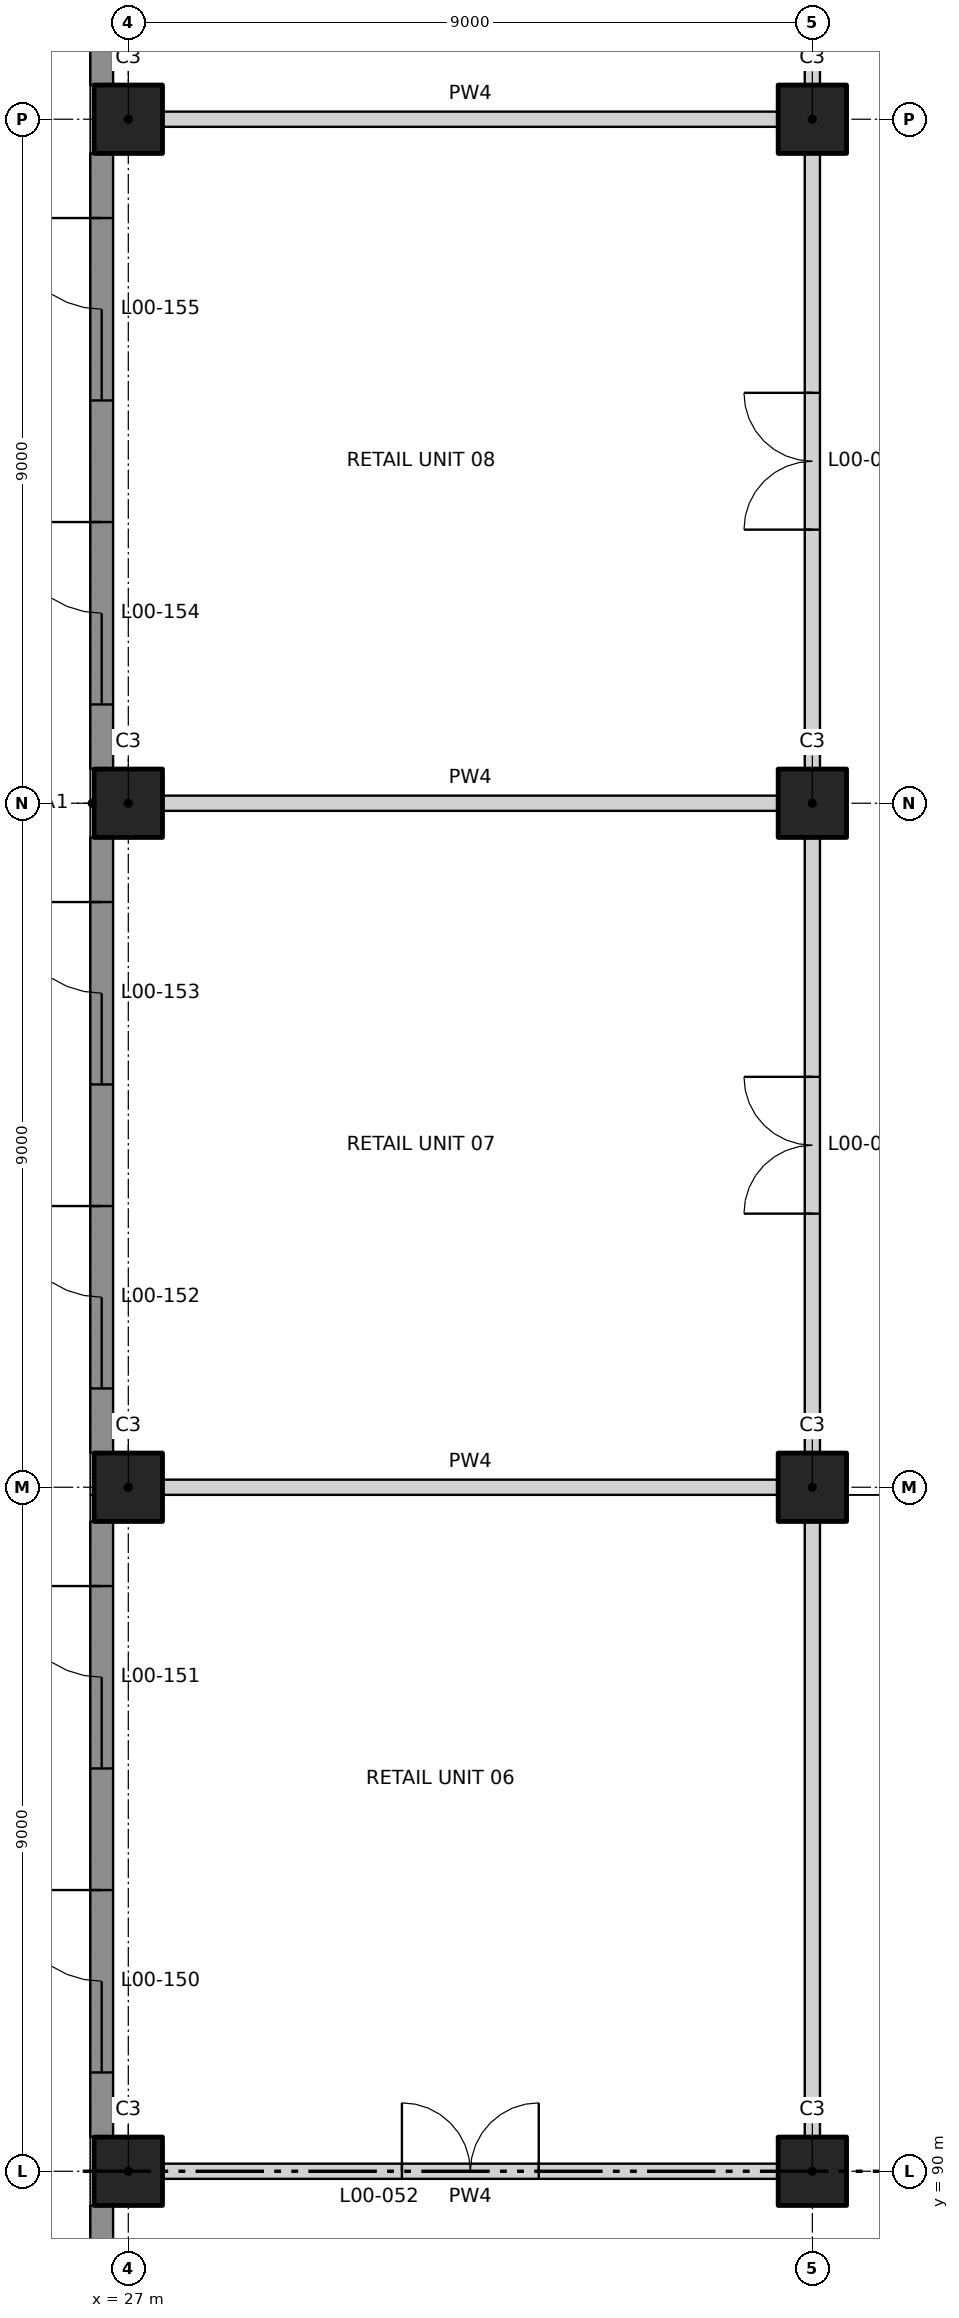
"""IFC4 building model, lengths in metres.
Left out: names, types, materials, properties, quantities, classifications, styles, units other than length and angle.
Written with IfcOpenShell. Run it as: python <this file> out.ifc"""

import sys

from ifc_helpers import new_model, si_unit, direction, frame, frame_2d, origin, origin_2d, place, context, subcontext, project, spatial, rectangle, extrude, element, fill, save


model = new_model("IFC4")
c1 = context("Model", 3, precision=1e-05, world=origin(), true_north=direction((0.0, 1.0)))
c2 = subcontext(c1, "Body", "Model", "MODEL_VIEW")
j1 = project(units=[si_unit("LENGTHUNIT", "METRE"), si_unit("PLANEANGLEUNIT", "RADIAN")], contexts=[c1])
p1 = place(None, origin())
s1 = spatial("IfcSite", under=j1, at=p1, CompositionType="ELEMENT")
p2 = place(p1, origin())
s2 = spatial("IfcBuilding", under=s1, at=p2, CompositionType="ELEMENT")
p3 = place(p2, origin())
s3 = spatial("IfcBuildingStorey", under=s2, at=p3, CompositionType="ELEMENT", Elevation=0.0)
for number, where, z_axis, x_axis in (
    (1, (27.0, 90.0, 0.0), (0.0, 0.0, 1.0), (1.0, 0.0, 0.0)),
    (2, (27.0, 99.0, 0.0), (0.0, 0.0, 1.0), (1.0, 0.0, 0.0)),
    (3, (27.0, 108.0, 0.0), (0.0, 0.0, 1.0), (1.0, 0.0, 0.0)),
    (4, (27.0, 117.0, 0.0), (0.0, 0.0, 1.0), (1.0, 0.0, 0.0)),
    (5, (36.0, 90.0, 0.0), (0.0, 0.0, 1.0), (1.0, 0.0, 0.0)),
    (6, (36.0, 99.0, 0.0), (0.0, 0.0, 1.0), (1.0, 0.0, 0.0)),
    (7, (36.0, 108.0, 0.0), (0.0, 0.0, 1.0), (1.0, 0.0, 0.0)),
    (8, (36.0, 117.0, 0.0), (0.0, 0.0, 1.0), (1.0, 0.0, 0.0)),
):
    element("IfcColumn", number, at=place(p3, frame(where, z_axis=z_axis, x_axis=x_axis)), inside=s3, PredefinedType="COLUMN", context=c2, shape_type="SweptSolid", body=[
        extrude(rectangle(XDim=0.9, YDim=0.9, at=origin_2d()), origin(), (0.0, 0.0, 1.0), 7.0),
    ])
p4 = place(p3, frame((27.45, 90.0, 0.0), z_axis=(0.0, 0.0, 1.0), x_axis=(1.0, 0.0, 0.0)))
e9 = element("IfcWall", 9, at=p4, inside=s3, PredefinedType="PARTITIONING", context=c2, shape_type="SweptSolid", body=[
    extrude(rectangle(XDim=8.1, YDim=0.2, at=frame_2d((4.05, 0.0))), origin(), (0.0, 0.0, 1.0), 5.75),
])
p5 = place(p4, frame((3.15, 0.0, 0.0)))
e10 = element("IfcOpeningElement", 10, at=p5, cuts=e9, PredefinedType="OPENING", context=c2, shape_type="SweptSolid", body=[
    extrude(rectangle(XDim=1.8, YDim=2.1, at=frame_2d((0.9, 1.05))), frame((0.0, 0.11, 0.0), z_axis=(0.0, -1.0, 0.0), x_axis=(1.0, 0.0, 0.0)), (0.0, 0.0, 1.0), 0.22),
])
for number, where, z_axis, x_axis in (
    (11, (27.45, 99.0, 0.0), (0.0, 0.0, 1.0), (1.0, 0.0, 0.0)),
    (12, (27.45, 108.0, 0.0), (0.0, 0.0, 1.0), (1.0, 0.0, 0.0)),
    (13, (27.45, 117.0, 0.0), (0.0, 0.0, 1.0), (1.0, 0.0, 0.0)),
    (14, (36.0, 90.45, 0.0), (0.0, 0.0, 1.0), (0.0, 1.0, 0.0)),
):
    element("IfcWall", number, at=place(p3, frame(where, z_axis=z_axis, x_axis=x_axis)), inside=s3, PredefinedType="PARTITIONING", context=c2, shape_type="SweptSolid", body=[
        extrude(rectangle(XDim=8.1, YDim=0.2, at=frame_2d((4.05, 0.0))), origin(), (0.0, 0.0, 1.0), 5.75),
    ])
p6 = place(p3, frame((36.0, 99.45, 0.0), z_axis=(0.0, 0.0, 1.0), x_axis=(0.0, 1.0, 0.0)))
e15 = element("IfcWall", 15, at=p6, inside=s3, PredefinedType="PARTITIONING", context=c2, shape_type="SweptSolid", body=[
    extrude(rectangle(XDim=8.1, YDim=0.2, at=frame_2d((4.05, 0.0))), origin(), (0.0, 0.0, 1.0), 5.75),
])
p7 = place(p6, frame((3.15, 0.0, 0.0)))
e16 = element("IfcOpeningElement", 16, at=p7, cuts=e15, PredefinedType="OPENING", context=c2, shape_type="SweptSolid", body=[
    extrude(rectangle(XDim=1.8, YDim=2.1, at=frame_2d((0.9, 1.05))), frame((0.0, 0.11, 0.0), z_axis=(0.0, -1.0, 0.0), x_axis=(1.0, 0.0, 0.0)), (0.0, 0.0, 1.0), 0.22),
])
p8 = place(p3, frame((36.0, 108.45, 0.0), z_axis=(0.0, 0.0, 1.0), x_axis=(0.0, 1.0, 0.0)))
e17 = element("IfcWall", 17, at=p8, inside=s3, PredefinedType="PARTITIONING", context=c2, shape_type="SweptSolid", body=[
    extrude(rectangle(XDim=8.1, YDim=0.2, at=frame_2d((4.05, 0.0))), origin(), (0.0, 0.0, 1.0), 5.75),
])
p9 = place(p8, frame((3.15, 0.0, 0.0)))
e18 = element("IfcOpeningElement", 18, at=p9, cuts=e17, PredefinedType="OPENING", context=c2, shape_type="SweptSolid", body=[
    extrude(rectangle(XDim=1.8, YDim=2.1, at=frame_2d((0.9, 1.05))), frame((0.0, 0.11, 0.0), z_axis=(0.0, -1.0, 0.0), x_axis=(1.0, 0.0, 0.0)), (0.0, 0.0, 1.0), 0.22),
])
p10 = place(p3, frame((36.0, 117.45, 0.0), z_axis=(0.0, 0.0, 1.0), x_axis=(0.0, 1.0, 0.0)))
e19 = element("IfcWall", 19, at=p10, inside=s3, PredefinedType="PARTITIONING", context=c2, shape_type="SweptSolid", body=[
    extrude(rectangle(XDim=8.55, YDim=0.2, at=frame_2d((4.275, 0.0))), origin(), (0.0, 0.0, 1.0), 5.75),
])
p11 = place(p10, frame((3.775, 0.0, 0.0)))
e20 = element("IfcOpeningElement", 20, at=p11, cuts=e19, PredefinedType="OPENING", context=c2, shape_type="SweptSolid", body=[
    extrude(rectangle(XDim=1.0, YDim=2.1, at=frame_2d((0.5, 1.05))), frame((0.0, 0.11, 0.0), z_axis=(0.0, -1.0, 0.0), x_axis=(1.0, 0.0, 0.0)), (0.0, 0.0, 1.0), 0.22),
])
p12 = place(p3, frame((26.65, 89.55, 0.0), z_axis=(0.0, 0.0, 1.0), x_axis=(0.0, -1.0, 0.0)))
e21 = element("IfcWall", 21, at=p12, inside=s3, PredefinedType="SOLIDWALL", context=c2, shape_type="SweptSolid", body=[
    extrude(rectangle(XDim=8.1, YDim=0.3, at=frame_2d((4.05, 0.0))), origin(), (0.0, 0.0, 1.0), 7.0),
])
p13 = place(p12, frame((4.85, 0.0, 0.0)))
e22 = element("IfcOpeningElement", 22, at=p13, cuts=e21, PredefinedType="OPENING", context=c2, shape_type="SweptSolid", body=[
    extrude(rectangle(XDim=2.4, YDim=2.4, at=frame_2d((1.2, 1.2))), frame((0.0, 0.16, 0.0), z_axis=(0.0, -1.0, 0.0), x_axis=(1.0, 0.0, 0.0)), (0.0, 0.0, 1.0), 0.32),
])
p14 = place(p12, frame((0.85, 0.0, 0.0)))
e23 = element("IfcOpeningElement", 23, at=p14, cuts=e21, PredefinedType="OPENING", context=c2, shape_type="SweptSolid", body=[
    extrude(rectangle(XDim=2.4, YDim=2.4, at=frame_2d((1.2, 1.2))), frame((0.0, 0.16, 0.0), z_axis=(0.0, -1.0, 0.0), x_axis=(1.0, 0.0, 0.0)), (0.0, 0.0, 1.0), 0.32),
])
p15 = place(p3, frame((26.65, 98.55, 0.0), z_axis=(0.0, 0.0, 1.0), x_axis=(0.0, -1.0, 0.0)))
e24 = element("IfcWall", 24, at=p15, inside=s3, PredefinedType="SOLIDWALL", context=c2, shape_type="SweptSolid", body=[
    extrude(rectangle(XDim=8.1, YDim=0.3, at=frame_2d((4.05, 0.0))), origin(), (0.0, 0.0, 1.0), 7.0),
])
p16 = place(p15, frame((4.85, 0.0, 0.0)))
e25 = element("IfcOpeningElement", 25, at=p16, cuts=e24, PredefinedType="OPENING", context=c2, shape_type="SweptSolid", body=[
    extrude(rectangle(XDim=2.4, YDim=2.4, at=frame_2d((1.2, 1.2))), frame((0.0, 0.16, 0.0), z_axis=(0.0, -1.0, 0.0), x_axis=(1.0, 0.0, 0.0)), (0.0, 0.0, 1.0), 0.32),
])
p17 = place(p15, frame((0.85, 0.0, 0.0)))
e26 = element("IfcOpeningElement", 26, at=p17, cuts=e24, PredefinedType="OPENING", context=c2, shape_type="SweptSolid", body=[
    extrude(rectangle(XDim=2.4, YDim=2.4, at=frame_2d((1.2, 1.2))), frame((0.0, 0.16, 0.0), z_axis=(0.0, -1.0, 0.0), x_axis=(1.0, 0.0, 0.0)), (0.0, 0.0, 1.0), 0.32),
])
p18 = place(p3, frame((26.65, 107.55, 0.0), z_axis=(0.0, 0.0, 1.0), x_axis=(0.0, -1.0, 0.0)))
e27 = element("IfcWall", 27, at=p18, inside=s3, PredefinedType="SOLIDWALL", context=c2, shape_type="SweptSolid", body=[
    extrude(rectangle(XDim=8.1, YDim=0.3, at=frame_2d((4.05, 0.0))), origin(), (0.0, 0.0, 1.0), 7.0),
])
p19 = place(p18, frame((4.85, 0.0, 0.0)))
e28 = element("IfcOpeningElement", 28, at=p19, cuts=e27, PredefinedType="OPENING", context=c2, shape_type="SweptSolid", body=[
    extrude(rectangle(XDim=2.4, YDim=2.4, at=frame_2d((1.2, 1.2))), frame((0.0, 0.16, 0.0), z_axis=(0.0, -1.0, 0.0), x_axis=(1.0, 0.0, 0.0)), (0.0, 0.0, 1.0), 0.32),
])
p20 = place(p18, frame((0.85, 0.0, 0.0)))
e29 = element("IfcOpeningElement", 29, at=p20, cuts=e27, PredefinedType="OPENING", context=c2, shape_type="SweptSolid", body=[
    extrude(rectangle(XDim=2.4, YDim=2.4, at=frame_2d((1.2, 1.2))), frame((0.0, 0.16, 0.0), z_axis=(0.0, -1.0, 0.0), x_axis=(1.0, 0.0, 0.0)), (0.0, 0.0, 1.0), 0.32),
])
p21 = place(p3, frame((26.65, 116.55, 0.0), z_axis=(0.0, 0.0, 1.0), x_axis=(0.0, -1.0, 0.0)))
e30 = element("IfcWall", 30, at=p21, inside=s3, PredefinedType="SOLIDWALL", context=c2, shape_type="SweptSolid", body=[
    extrude(rectangle(XDim=8.1, YDim=0.3, at=frame_2d((4.05, 0.0))), origin(), (0.0, 0.0, 1.0), 7.0),
])
p22 = place(p21, frame((4.85, 0.0, 0.0)))
e31 = element("IfcOpeningElement", 31, at=p22, cuts=e30, PredefinedType="OPENING", context=c2, shape_type="SweptSolid", body=[
    extrude(rectangle(XDim=2.4, YDim=2.4, at=frame_2d((1.2, 1.2))), frame((0.0, 0.16, 0.0), z_axis=(0.0, -1.0, 0.0), x_axis=(1.0, 0.0, 0.0)), (0.0, 0.0, 1.0), 0.32),
])
p23 = place(p21, frame((0.85, 0.0, 0.0)))
e32 = element("IfcOpeningElement", 32, at=p23, cuts=e30, PredefinedType="OPENING", context=c2, shape_type="SweptSolid", body=[
    extrude(rectangle(XDim=2.4, YDim=2.4, at=frame_2d((1.2, 1.2))), frame((0.0, 0.16, 0.0), z_axis=(0.0, -1.0, 0.0), x_axis=(1.0, 0.0, 0.0)), (0.0, 0.0, 1.0), 0.32),
])
p24 = place(p3, frame((26.65, 126.0, 0.0), z_axis=(0.0, 0.0, 1.0), x_axis=(0.0, -1.0, 0.0)))
e33 = element("IfcWall", 33, at=p24, inside=s3, PredefinedType="SOLIDWALL", context=c2, shape_type="SweptSolid", body=[
    extrude(rectangle(XDim=8.55, YDim=0.3, at=frame_2d((4.275, 0.0))), origin(), (0.0, 0.0, 1.0), 7.0),
])
p25 = place(p24, frame((5.3, 0.0, 0.0)))
e34 = element("IfcOpeningElement", 34, at=p25, cuts=e33, PredefinedType="OPENING", context=c2, shape_type="SweptSolid", body=[
    extrude(rectangle(XDim=2.4, YDim=2.4, at=frame_2d((1.2, 1.2))), frame((0.0, 0.16, 0.0), z_axis=(0.0, -1.0, 0.0), x_axis=(1.0, 0.0, 0.0)), (0.0, 0.0, 1.0), 0.32),
])
p26 = place(p24, frame((1.3, 0.0, 0.0)))
e35 = element("IfcOpeningElement", 35, at=p26, cuts=e33, PredefinedType="OPENING", context=c2, shape_type="SweptSolid", body=[
    extrude(rectangle(XDim=2.4, YDim=2.4, at=frame_2d((1.2, 1.2))), frame((0.0, 0.16, 0.0), z_axis=(0.0, -1.0, 0.0), x_axis=(1.0, 0.0, 0.0)), (0.0, 0.0, 1.0), 0.32),
])
p27 = place(p5, origin())
e36 = element("IfcDoor", 36, at=p27, inside=s3, OperationType="DOUBLE_DOOR_DOUBLE_SWING", PredefinedType="DOOR", context=c2, shape_type="SweptSolid", body=[
    extrude(rectangle(XDim=1.8, YDim=2.1, at=frame_2d((0.9, 1.05))), frame((0.0, 0.025, 0.0), z_axis=(0.0, -1.0, 0.0), x_axis=(1.0, 0.0, 0.0)), (0.0, 0.0, 1.0), 0.05),
])
fill(e10, e36)
p28 = place(p7, origin())
e37 = element("IfcDoor", 37, at=p28, inside=s3, OperationType="DOUBLE_DOOR_DOUBLE_SWING", PredefinedType="DOOR", context=c2, shape_type="SweptSolid", body=[
    extrude(rectangle(XDim=1.8, YDim=2.1, at=frame_2d((0.9, 1.05))), frame((0.0, 0.025, 0.0), z_axis=(0.0, -1.0, 0.0), x_axis=(1.0, 0.0, 0.0)), (0.0, 0.0, 1.0), 0.05),
])
fill(e16, e37)
p29 = place(p9, origin())
e38 = element("IfcDoor", 38, at=p29, inside=s3, OperationType="DOUBLE_DOOR_DOUBLE_SWING", PredefinedType="DOOR", context=c2, shape_type="SweptSolid", body=[
    extrude(rectangle(XDim=1.8, YDim=2.1, at=frame_2d((0.9, 1.05))), frame((0.0, 0.025, 0.0), z_axis=(0.0, -1.0, 0.0), x_axis=(1.0, 0.0, 0.0)), (0.0, 0.0, 1.0), 0.05),
])
fill(e18, e38)
p30 = place(p16, frame((2.4, 0.0, 0.0), z_axis=(0.0, 0.0, 1.0), x_axis=(-1.0, 0.0, 0.0)))
e39 = element("IfcDoor", 39, at=p30, inside=s3, OperationType="DOUBLE_DOOR_SINGLE_SWING", PredefinedType="DOOR", context=c2, shape_type="SweptSolid", body=[
    extrude(rectangle(XDim=2.4, YDim=2.4, at=frame_2d((1.2, 1.2))), frame((0.0, 0.025, 0.0), z_axis=(0.0, -1.0, 0.0), x_axis=(1.0, 0.0, 0.0)), (0.0, 0.0, 1.0), 0.05),
])
fill(e25, e39)
p31 = place(p17, frame((2.4, 0.0, 0.0), z_axis=(0.0, 0.0, 1.0), x_axis=(-1.0, 0.0, 0.0)))
e40 = element("IfcDoor", 40, at=p31, inside=s3, OperationType="DOUBLE_DOOR_SINGLE_SWING", PredefinedType="DOOR", context=c2, shape_type="SweptSolid", body=[
    extrude(rectangle(XDim=2.4, YDim=2.4, at=frame_2d((1.2, 1.2))), frame((0.0, 0.025, 0.0), z_axis=(0.0, -1.0, 0.0), x_axis=(1.0, 0.0, 0.0)), (0.0, 0.0, 1.0), 0.05),
])
fill(e26, e40)
p32 = place(p19, frame((2.4, 0.0, 0.0), z_axis=(0.0, 0.0, 1.0), x_axis=(-1.0, 0.0, 0.0)))
e41 = element("IfcDoor", 41, at=p32, inside=s3, OperationType="DOUBLE_DOOR_SINGLE_SWING", PredefinedType="DOOR", context=c2, shape_type="SweptSolid", body=[
    extrude(rectangle(XDim=2.4, YDim=2.4, at=frame_2d((1.2, 1.2))), frame((0.0, 0.025, 0.0), z_axis=(0.0, -1.0, 0.0), x_axis=(1.0, 0.0, 0.0)), (0.0, 0.0, 1.0), 0.05),
])
fill(e28, e41)
p33 = place(p20, frame((2.4, 0.0, 0.0), z_axis=(0.0, 0.0, 1.0), x_axis=(-1.0, 0.0, 0.0)))
e42 = element("IfcDoor", 42, at=p33, inside=s3, OperationType="DOUBLE_DOOR_SINGLE_SWING", PredefinedType="DOOR", context=c2, shape_type="SweptSolid", body=[
    extrude(rectangle(XDim=2.4, YDim=2.4, at=frame_2d((1.2, 1.2))), frame((0.0, 0.025, 0.0), z_axis=(0.0, -1.0, 0.0), x_axis=(1.0, 0.0, 0.0)), (0.0, 0.0, 1.0), 0.05),
])
fill(e29, e42)
p34 = place(p22, frame((2.4, 0.0, 0.0), z_axis=(0.0, 0.0, 1.0), x_axis=(-1.0, 0.0, 0.0)))
e43 = element("IfcDoor", 43, at=p34, inside=s3, OperationType="DOUBLE_DOOR_SINGLE_SWING", PredefinedType="DOOR", context=c2, shape_type="SweptSolid", body=[
    extrude(rectangle(XDim=2.4, YDim=2.4, at=frame_2d((1.2, 1.2))), frame((0.0, 0.025, 0.0), z_axis=(0.0, -1.0, 0.0), x_axis=(1.0, 0.0, 0.0)), (0.0, 0.0, 1.0), 0.05),
])
fill(e31, e43)
p35 = place(p23, frame((2.4, 0.0, 0.0), z_axis=(0.0, 0.0, 1.0), x_axis=(-1.0, 0.0, 0.0)))
e44 = element("IfcDoor", 44, at=p35, inside=s3, OperationType="DOUBLE_DOOR_SINGLE_SWING", PredefinedType="DOOR", context=c2, shape_type="SweptSolid", body=[
    extrude(rectangle(XDim=2.4, YDim=2.4, at=frame_2d((1.2, 1.2))), frame((0.0, 0.025, 0.0), z_axis=(0.0, -1.0, 0.0), x_axis=(1.0, 0.0, 0.0)), (0.0, 0.0, 1.0), 0.05),
])
fill(e32, e44)
save(model, sys.argv[1])
